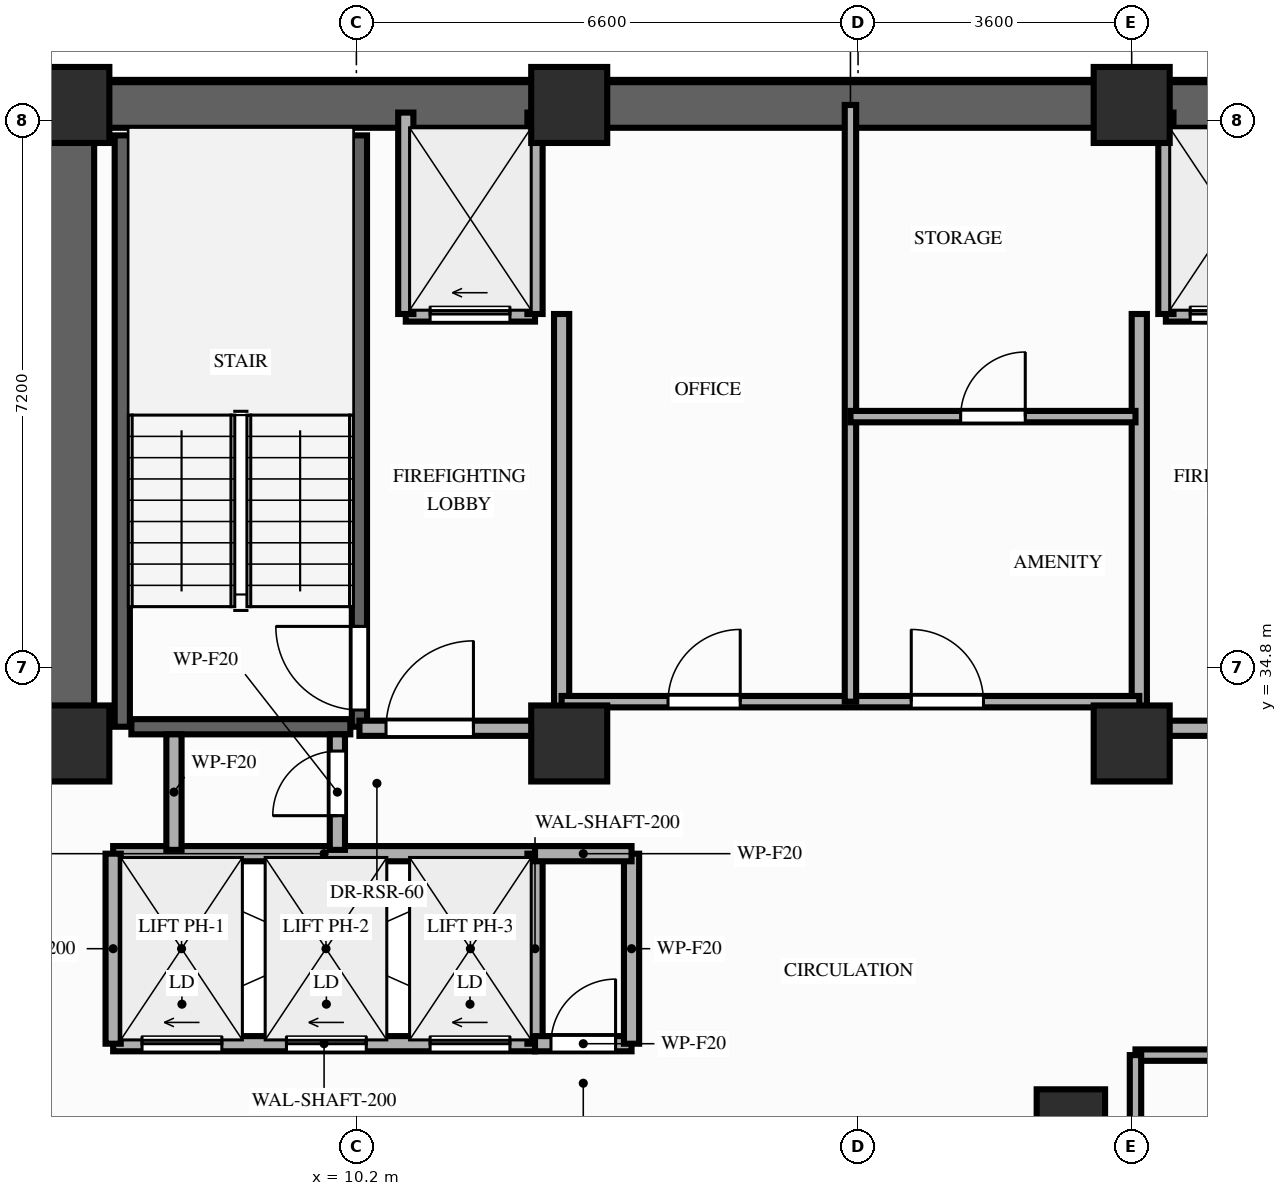
"""IFC4 building model, lengths in metres.
Left out: names, types, materials, properties, quantities, classifications, styles, units other than length and angle.
Written with IfcOpenShell. Run it as: python <this file> out.ifc"""

import sys

from ifc_helpers import new_model, si_unit, direction, frame, frame_2d, origin, origin_2d, place, context, subcontext, project, spatial, rectangle, extrude, element, fill, save


model = new_model("IFC4")
c1 = context("Model", 3, precision=1e-05, world=origin(), true_north=direction((0.0, 1.0)))
c2 = subcontext(c1, "Body", "Model", "MODEL_VIEW")
j1 = project(units=[si_unit("LENGTHUNIT", "METRE"), si_unit("PLANEANGLEUNIT", "RADIAN")], contexts=[c1])
p1 = place(None, origin())
s1 = spatial("IfcSite", under=j1, at=p1, CompositionType="ELEMENT")
p2 = place(p1, origin())
s2 = spatial("IfcBuilding", under=s1, at=p2, CompositionType="ELEMENT")
p3 = place(p2, frame((0.0, 0.0, 179.2)))
s3 = spatial("IfcBuildingStorey", under=s2, at=p3, CompositionType="ELEMENT", Elevation=179.2)
for number, where, z_axis, x_axis in (
    (1, (6.45, 33.8, 0.0), (0.0, 0.0, 1.0), (1.0, 0.0, 0.0)),
    (2, (13.0, 33.8, 0.0), (0.0, 0.0, 1.0), (1.0, 0.0, 0.0)),
    (3, (20.4, 33.8, 0.0), (0.0, 0.0, 1.0), (1.0, 0.0, 0.0)),
    (4, (6.45, 42.2, 0.0), (0.0, 0.0, 1.0), (1.0, 0.0, 0.0)),
    (5, (13.0, 42.2, 0.0), (0.0, 0.0, 1.0), (1.0, 0.0, 0.0)),
    (6, (20.4, 42.2, 0.0), (0.0, 0.0, 1.0), (1.0, 0.0, 0.0)),
):
    element("IfcColumn", number, at=place(p3, frame(where, z_axis=z_axis, x_axis=x_axis)), inside=s3, PredefinedType="COLUMN", context=c2, shape_type="SweptSolid", body=[
        extrude(rectangle(XDim=1.0, YDim=1.0, at=origin_2d()), origin(), (0.0, 0.0, 1.0), 3.2),
    ])
p4 = place(p3, frame((19.6, 28.8, 0.0), z_axis=(0.0, 0.0, 1.0), x_axis=(1.0, 0.0, 0.0)))
e7 = element("IfcColumn", 7, at=p4, inside=s3, PredefinedType="COLUMN", context=c2, shape_type="SweptSolid", body=[
    extrude(rectangle(XDim=0.9, YDim=0.9, at=origin_2d()), origin(), (0.0, 0.0, 1.0), 3.2),
])
p5 = place(p3, frame((6.45, 42.2, 0.0), z_axis=(0.0, 0.0, 1.0), x_axis=(1.0, 0.0, 0.0)))
e8 = element("IfcWall", 8, at=p5, inside=s3, PredefinedType="SHEAR", context=c2, shape_type="SweptSolid", body=[
    extrude(rectangle(XDim=20.45, YDim=0.6, at=frame_2d((10.225, 0.0))), origin(), (0.0, 0.0, 1.0), 3.02),
])
p6 = place(p3, frame((6.45, 33.8, 0.0), z_axis=(0.0, 0.0, 1.0), x_axis=(0.0, 1.0, 0.0)))
e9 = element("IfcWall", 9, at=p6, inside=s3, PredefinedType="SHEAR", context=c2, shape_type="SweptSolid", body=[
    extrude(rectangle(XDim=7.95, YDim=0.6, at=frame_2d((3.975, 0.0))), origin(), (0.0, 0.0, 1.0), 3.02),
])
p7 = place(p3, frame((7.12, 34.02, 0.0), z_axis=(0.0, 0.0, 1.0), x_axis=(0.0, 1.0, 0.0)))
e10 = element("IfcWall", 10, at=p7, inside=s3, PredefinedType="SHEAR", context=c2, shape_type="SweptSolid", body=[
    extrude(rectangle(XDim=7.78, YDim=0.2, at=frame_2d((3.89, 0.0))), origin(), (0.0, 0.0, 1.0), 3.02),
])
p8 = place(p3, frame((10.24, 34.02, 0.0), z_axis=(0.0, 0.0, 1.0), x_axis=(0.0, 1.0, 0.0)))
e11 = element("IfcWall", 11, at=p8, inside=s3, PredefinedType="SHEAR", context=c2, shape_type="SweptSolid", body=[
    extrude(rectangle(XDim=7.78, YDim=0.2, at=frame_2d((3.89, 0.0))), origin(), (0.0, 0.0, 1.0), 3.02),
])
p9 = place(p8, frame((0.22, 0.0, 0.0)))
e12 = element("IfcOpeningElement", 12, at=p9, cuts=e11, PredefinedType="OPENING", context=c2, shape_type="SweptSolid", body=[
    extrude(rectangle(XDim=1.1, YDim=2.15, at=frame_2d((0.55, 1.075))), frame((0.0, 0.11, 0.0), z_axis=(0.0, -1.0, 0.0), x_axis=(1.0, 0.0, 0.0)), (0.0, 0.0, 1.0), 0.22),
])
p10 = place(p3, frame((7.24, 34.02, 0.0), z_axis=(0.0, 0.0, 1.0), x_axis=(1.0, 0.0, 0.0)))
e13 = element("IfcWall", 13, at=p10, inside=s3, PredefinedType="SHEAR", context=c2, shape_type="SweptSolid", body=[
    extrude(rectangle(XDim=2.88, YDim=0.2, at=frame_2d((1.44, 0.0))), origin(), (0.0, 0.0, 1.0), 3.02),
])
p11 = place(p3, frame((7.0, 29.85, 0.0), z_axis=(0.0, 0.0, 1.0), x_axis=(1.0, 0.0, 0.0)))
e14 = element("IfcWall", 14, at=p11, inside=s3, PredefinedType="MOVABLE", context=c2, shape_type="SweptSolid", body=[
    extrude(rectangle(XDim=5.55, YDim=0.2, at=frame_2d((2.775, 0.0))), origin(), (0.0, 0.0, 1.0), 3.02),
])
p12 = place(p11, frame((0.38, 0.0, 0.0)))
e15 = element("IfcOpeningElement", 15, at=p12, cuts=e14, PredefinedType="OPENING", context=c2, shape_type="SweptSolid", body=[
    extrude(rectangle(XDim=1.05, YDim=2.15, at=frame_2d((0.525, 1.075))), frame((0.0, 0.11, 0.0), z_axis=(0.0, -1.0, 0.0), x_axis=(1.0, 0.0, 0.0)), (0.0, 0.0, 1.0), 0.22),
])
p13 = place(p11, frame((2.28, 0.0, 0.0)))
e16 = element("IfcOpeningElement", 16, at=p13, cuts=e14, PredefinedType="OPENING", context=c2, shape_type="SweptSolid", body=[
    extrude(rectangle(XDim=1.05, YDim=2.15, at=frame_2d((0.525, 1.075))), frame((0.0, 0.11, 0.0), z_axis=(0.0, -1.0, 0.0), x_axis=(1.0, 0.0, 0.0)), (0.0, 0.0, 1.0), 0.22),
])
p14 = place(p11, frame((4.17, 0.0, 0.0)))
e17 = element("IfcOpeningElement", 17, at=p14, cuts=e14, PredefinedType="OPENING", context=c2, shape_type="SweptSolid", body=[
    extrude(rectangle(XDim=1.05, YDim=2.15, at=frame_2d((0.525, 1.075))), frame((0.0, 0.11, 0.0), z_axis=(0.0, -1.0, 0.0), x_axis=(1.0, 0.0, 0.0)), (0.0, 0.0, 1.0), 0.22),
])
p15 = place(p3, frame((7.0, 32.35, 0.0), z_axis=(0.0, 0.0, 1.0), x_axis=(1.0, 0.0, 0.0)))
e18 = element("IfcWall", 18, at=p15, inside=s3, PredefinedType="MOVABLE", context=c2, shape_type="SweptSolid", body=[
    extrude(rectangle(XDim=5.55, YDim=0.2, at=frame_2d((2.775, 0.0))), origin(), (0.0, 0.0, 1.0), 3.02),
])
for number, where, z_axis, x_axis in (
    (19, (7.0, 29.85, 0.0), (0.0, 0.0, 1.0), (0.0, 1.0, 0.0)),
    (20, (12.55, 29.85, 0.0), (0.0, 0.0, 1.0), (0.0, 1.0, 0.0)),
):
    element("IfcWall", number, at=place(p3, frame(where, z_axis=z_axis, x_axis=x_axis)), inside=s3, PredefinedType="MOVABLE", context=c2, shape_type="SweptSolid", body=[
        extrude(rectangle(XDim=2.5, YDim=0.2, at=frame_2d((1.25, 0.0))), origin(), (0.0, 0.0, 1.0), 3.02),
    ])
p16 = place(p3, frame((10.85, 39.45, 0.0), z_axis=(0.0, 0.0, 1.0), x_axis=(1.0, 0.0, 0.0)))
e21 = element("IfcWall", 21, at=p16, inside=s3, PredefinedType="MOVABLE", context=c2, shape_type="SweptSolid", body=[
    extrude(rectangle(XDim=1.7, YDim=0.2, at=frame_2d((0.85, 0.0))), origin(), (0.0, 0.0, 1.0), 3.02),
])
p17 = place(p16, frame((0.32, 0.0, 0.0)))
e22 = element("IfcOpeningElement", 22, at=p17, cuts=e21, PredefinedType="OPENING", context=c2, shape_type="SweptSolid", body=[
    extrude(rectangle(XDim=1.05, YDim=2.15, at=frame_2d((0.525, 1.075))), frame((0.0, 0.11, 0.0), z_axis=(0.0, -1.0, 0.0), x_axis=(1.0, 0.0, 0.0)), (0.0, 0.0, 1.0), 0.22),
])
p18 = place(p3, frame((20.85, 39.45, 0.0), z_axis=(0.0, 0.0, 1.0), x_axis=(1.0, 0.0, 0.0)))
e23 = element("IfcWall", 23, at=p18, inside=s3, PredefinedType="MOVABLE", context=c2, shape_type="SweptSolid", body=[
    extrude(rectangle(XDim=1.7, YDim=0.2, at=frame_2d((0.85, 0.0))), origin(), (0.0, 0.0, 1.0), 3.02),
])
p19 = place(p18, frame((0.32, 0.0, 0.0)))
e24 = element("IfcOpeningElement", 24, at=p19, cuts=e23, PredefinedType="OPENING", context=c2, shape_type="SweptSolid", body=[
    extrude(rectangle(XDim=1.05, YDim=2.15, at=frame_2d((0.525, 1.075))), frame((0.0, 0.11, 0.0), z_axis=(0.0, -1.0, 0.0), x_axis=(1.0, 0.0, 0.0)), (0.0, 0.0, 1.0), 0.22),
])
for number, where, z_axis, x_axis in (
    (25, (10.85, 39.45, 0.0), (0.0, 0.0, 1.0), (0.0, 1.0, 0.0)),
    (26, (12.55, 39.45, 0.0), (0.0, 0.0, 1.0), (0.0, 1.0, 0.0)),
):
    element("IfcWall", number, at=place(p3, frame(where, z_axis=z_axis, x_axis=x_axis)), inside=s3, PredefinedType="MOVABLE", context=c2, shape_type="SweptSolid", body=[
        extrude(rectangle(XDim=2.65, YDim=0.2, at=frame_2d((1.325, 0.0))), origin(), (0.0, 0.0, 1.0), 2.45),
    ])
p20 = place(p3, frame((12.9, 34.0, 0.0), z_axis=(0.0, 0.0, 1.0), x_axis=(0.0, 1.0, 0.0)))
e27 = element("IfcWall", 27, at=p20, inside=s3, PredefinedType="PARTITIONING", context=c2, shape_type="SweptSolid", body=[
    extrude(rectangle(XDim=5.45, YDim=0.2, at=frame_2d((2.725, 0.0))), origin(), (0.0, 0.0, 1.0), 2.45),
])
p21 = place(p3, frame((10.24, 34.0, 0.0), z_axis=(0.0, 0.0, 1.0), x_axis=(1.0, 0.0, 0.0)))
e28 = element("IfcWall", 28, at=p21, inside=s3, PredefinedType="PARTITIONING", context=c2, shape_type="SweptSolid", body=[
    extrude(rectangle(XDim=2.66, YDim=0.2, at=frame_2d((1.33, 0.0))), origin(), (0.0, 0.0, 1.0), 2.45),
])
p22 = place(p21, frame((0.35, 0.0, 0.0)))
e29 = element("IfcOpeningElement", 29, at=p22, cuts=e28, PredefinedType="OPENING", context=c2, shape_type="SweptSolid", body=[
    extrude(rectangle(XDim=1.15, YDim=2.15, at=frame_2d((0.575, 1.075))), frame((0.0, 0.11, 0.0), z_axis=(0.0, -1.0, 0.0), x_axis=(1.0, 0.0, 0.0)), (0.0, 0.0, 1.0), 0.22),
])
p23 = place(p3, frame((20.85, 39.45, 0.0), z_axis=(0.0, 0.0, 1.0), x_axis=(0.0, 1.0, 0.0)))
e30 = element("IfcWall", 30, at=p23, inside=s3, PredefinedType="MOVABLE", context=c2, shape_type="SweptSolid", body=[
    extrude(rectangle(XDim=2.65, YDim=0.2, at=frame_2d((1.325, 0.0))), origin(), (0.0, 0.0, 1.0), 2.45),
])
p24 = place(p3, frame((20.5, 34.0, 0.0), z_axis=(0.0, 0.0, 1.0), x_axis=(0.0, 1.0, 0.0)))
e31 = element("IfcWall", 31, at=p24, inside=s3, PredefinedType="PARTITIONING", context=c2, shape_type="SweptSolid", body=[
    extrude(rectangle(XDim=5.45, YDim=0.2, at=frame_2d((2.725, 0.0))), origin(), (0.0, 0.0, 1.0), 2.45),
])
p25 = place(p3, frame((20.5, 34.0, 0.0), z_axis=(0.0, 0.0, 1.0), x_axis=(1.0, 0.0, 0.0)))
e32 = element("IfcWall", 32, at=p25, inside=s3, PredefinedType="PARTITIONING", context=c2, shape_type="SweptSolid", body=[
    extrude(rectangle(XDim=2.6, YDim=0.2, at=frame_2d((1.3, 0.0))), origin(), (0.0, 0.0, 1.0), 2.45),
])
p26 = place(p25, frame((1.05, 0.0, 0.0)))
e33 = element("IfcOpeningElement", 33, at=p26, cuts=e32, PredefinedType="OPENING", context=c2, shape_type="SweptSolid", body=[
    extrude(rectangle(XDim=1.15, YDim=2.15, at=frame_2d((0.575, 1.075))), frame((0.0, 0.11, 0.0), z_axis=(0.0, -1.0, 0.0), x_axis=(1.0, 0.0, 0.0)), (0.0, 0.0, 1.0), 0.22),
])
p27 = place(p3, frame((12.55, 29.85, 0.0), z_axis=(0.0, 0.0, 1.0), x_axis=(1.0, 0.0, 0.0)))
e34 = element("IfcWall", 34, at=p27, inside=s3, PredefinedType="PARTITIONING", context=c2, shape_type="SweptSolid", body=[
    extrude(rectangle(XDim=1.27, YDim=0.2, at=frame_2d((0.635, 0.0))), origin(), (0.0, 0.0, 1.0), 3.02),
])
p28 = place(p27, frame((0.21, 0.0, 0.0)))
e35 = element("IfcOpeningElement", 35, at=p28, cuts=e34, PredefinedType="OPENING", context=c2, shape_type="SweptSolid", body=[
    extrude(rectangle(XDim=0.85, YDim=2.05, at=frame_2d((0.425, 1.025))), frame((0.0, 0.11, 0.0), z_axis=(0.0, -1.0, 0.0), x_axis=(1.0, 0.0, 0.0)), (0.0, 0.0, 1.0), 0.22),
])
p29 = place(p3, frame((13.82, 29.85, 0.0), z_axis=(0.0, 0.0, 1.0), x_axis=(0.0, 1.0, 0.0)))
e36 = element("IfcWall", 36, at=p29, inside=s3, PredefinedType="PARTITIONING", context=c2, shape_type="SweptSolid", body=[
    extrude(rectangle(XDim=2.5, YDim=0.2, at=frame_2d((1.25, 0.0))), origin(), (0.0, 0.0, 1.0), 3.02),
])
p30 = place(p3, frame((12.55, 32.35, 0.0), z_axis=(0.0, 0.0, 1.0), x_axis=(1.0, 0.0, 0.0)))
e37 = element("IfcWall", 37, at=p30, inside=s3, PredefinedType="PARTITIONING", context=c2, shape_type="SweptSolid", body=[
    extrude(rectangle(XDim=1.27, YDim=0.2, at=frame_2d((0.635, 0.0))), origin(), (0.0, 0.0, 1.0), 3.02),
])
p31 = place(p3, frame((7.8, 32.4, 0.0), z_axis=(0.0, 0.0, 1.0), x_axis=(0.0, 1.0, 0.0)))
e38 = element("IfcWall", 38, at=p31, inside=s3, PredefinedType="PARTITIONING", context=c2, shape_type="SweptSolid", body=[
    extrude(rectangle(XDim=1.52, YDim=0.2, at=frame_2d((0.76, 0.0))), origin(), (0.0, 0.0, 1.0), 2.45),
])
p32 = place(p3, frame((9.95, 32.4, 0.0), z_axis=(0.0, 0.0, 1.0), x_axis=(0.0, 1.0, 0.0)))
e39 = element("IfcWall", 39, at=p32, inside=s3, PredefinedType="PARTITIONING", context=c2, shape_type="SweptSolid", body=[
    extrude(rectangle(XDim=1.52, YDim=0.2, at=frame_2d((0.76, 0.0))), origin(), (0.0, 0.0, 1.0), 2.45),
])
p33 = place(p32, frame((0.45, 0.0, 0.0)))
e40 = element("IfcOpeningElement", 40, at=p33, cuts=e39, PredefinedType="OPENING", context=c2, shape_type="SweptSolid", body=[
    extrude(rectangle(XDim=0.85, YDim=2.05, at=frame_2d((0.425, 1.025))), frame((0.0, 0.11, 0.0), z_axis=(0.0, -1.0, 0.0), x_axis=(1.0, 0.0, 0.0)), (0.0, 0.0, 1.0), 0.22),
])
p34 = place(p3, frame((12.9, 34.35, 0.0), z_axis=(0.0, 0.0, 1.0), x_axis=(1.0, 0.0, 0.0)))
e41 = element("IfcWall", 41, at=p34, inside=s3, PredefinedType="PARTITIONING", context=c2, shape_type="SweptSolid", body=[
    extrude(rectangle(XDim=7.6, YDim=0.15, at=frame_2d((3.8, 0.0))), origin(), (0.0, 0.0, 1.0), 3.02),
])
p35 = place(p34, frame((1.4, 0.0, 0.0)))
e42 = element("IfcOpeningElement", 42, at=p35, cuts=e41, PredefinedType="OPENING", context=c2, shape_type="SweptSolid", body=[
    extrude(rectangle(XDim=0.95, YDim=2.15, at=frame_2d((0.475, 1.075))), frame((0.0, 0.085, 0.0), z_axis=(0.0, -1.0, 0.0), x_axis=(1.0, 0.0, 0.0)), (0.0, 0.0, 1.0), 0.17),
])
p36 = place(p34, frame((4.6, 0.0, 0.0)))
e43 = element("IfcOpeningElement", 43, at=p36, cuts=e41, PredefinedType="OPENING", context=c2, shape_type="SweptSolid", body=[
    extrude(rectangle(XDim=0.95, YDim=2.15, at=frame_2d((0.475, 1.075))), frame((0.0, 0.085, 0.0), z_axis=(0.0, -1.0, 0.0), x_axis=(1.0, 0.0, 0.0)), (0.0, 0.0, 1.0), 0.17),
])
p37 = place(p3, frame((16.7, 34.35, 0.0), z_axis=(0.0, 0.0, 1.0), x_axis=(0.0, 1.0, 0.0)))
e44 = element("IfcWall", 44, at=p37, inside=s3, PredefinedType="PARTITIONING", context=c2, shape_type="SweptSolid", body=[
    extrude(rectangle(XDim=7.85, YDim=0.15, at=frame_2d((3.925, 0.0))), origin(), (0.0, 0.0, 1.0), 2.45),
])
p38 = place(p3, frame((16.7, 38.1, 0.0), z_axis=(0.0, 0.0, 1.0), x_axis=(1.0, 0.0, 0.0)))
e45 = element("IfcWall", 45, at=p38, inside=s3, PredefinedType="PARTITIONING", context=c2, shape_type="SweptSolid", body=[
    extrude(rectangle(XDim=3.75, YDim=0.15, at=frame_2d((1.875, 0.0))), origin(), (0.0, 0.0, 1.0), 3.02),
])
p39 = place(p38, frame((1.45, 0.0, 0.0)))
e46 = element("IfcOpeningElement", 46, at=p39, cuts=e45, PredefinedType="OPENING", context=c2, shape_type="SweptSolid", body=[
    extrude(rectangle(XDim=0.85, YDim=2.05, at=frame_2d((0.425, 1.025))), frame((0.0, 0.085, 0.0), z_axis=(0.0, -1.0, 0.0), x_axis=(1.0, 0.0, 0.0)), (0.0, 0.0, 1.0), 0.17),
])
p40 = place(p3, frame((20.45, 29.7, 0.0), z_axis=(0.0, 0.0, 1.0), x_axis=(1.0, 0.0, 0.0)))
e47 = element("IfcWall", 47, at=p40, inside=s3, PredefinedType="PARTITIONING", context=c2, shape_type="SweptSolid", body=[
    extrude(rectangle(XDim=6.7, YDim=0.15, at=frame_2d((3.35, 0.0))), origin(), (0.0, 0.0, 1.0), 3.02),
])
p41 = place(p40, frame((2.8, 0.0, 0.0)))
e48 = element("IfcOpeningElement", 48, at=p41, cuts=e47, PredefinedType="OPENING", context=c2, shape_type="SweptSolid", body=[
    extrude(rectangle(XDim=0.95, YDim=2.15, at=frame_2d((0.475, 1.075))), frame((0.0, 0.085, 0.0), z_axis=(0.0, -1.0, 0.0), x_axis=(1.0, 0.0, 0.0)), (0.0, 0.0, 1.0), 0.17),
])
p42 = place(p3, frame((20.45, 26.75, 0.0), z_axis=(0.0, 0.0, 1.0), x_axis=(0.0, 1.0, 0.0)))
e49 = element("IfcWall", 49, at=p42, inside=s3, PredefinedType="PARTITIONING", context=c2, shape_type="SweptSolid", body=[
    extrude(rectangle(XDim=2.95, YDim=0.15, at=frame_2d((1.475, 0.0))), origin(), (0.0, 0.0, 1.0), 2.45),
])
p43 = place(p9, origin())
e50 = element("IfcDoor", 50, at=p43, inside=s3, OperationType="SINGLE_SWING_RIGHT", PredefinedType="DOOR", context=c2, shape_type="SweptSolid", body=[
    extrude(rectangle(XDim=1.1, YDim=2.15, at=frame_2d((0.55, 1.075))), frame((0.0, 0.025, 0.0), z_axis=(0.0, -1.0, 0.0), x_axis=(1.0, 0.0, 0.0)), (0.0, 0.0, 1.0), 0.05),
])
fill(e12, e50)
p44 = place(p12, origin())
e51 = element("IfcDoor", 51, at=p44, inside=s3, OperationType="SLIDING_TO_LEFT", PredefinedType="DOOR", context=c2, shape_type="SweptSolid", body=[
    extrude(rectangle(XDim=1.05, YDim=2.15, at=frame_2d((0.525, 1.075))), frame((0.0, 0.025, 0.0), z_axis=(0.0, -1.0, 0.0), x_axis=(1.0, 0.0, 0.0)), (0.0, 0.0, 1.0), 0.05),
])
fill(e15, e51)
p45 = place(p13, origin())
e52 = element("IfcDoor", 52, at=p45, inside=s3, OperationType="SLIDING_TO_LEFT", PredefinedType="DOOR", context=c2, shape_type="SweptSolid", body=[
    extrude(rectangle(XDim=1.05, YDim=2.15, at=frame_2d((0.525, 1.075))), frame((0.0, 0.025, 0.0), z_axis=(0.0, -1.0, 0.0), x_axis=(1.0, 0.0, 0.0)), (0.0, 0.0, 1.0), 0.05),
])
fill(e16, e52)
p46 = place(p14, origin())
e53 = element("IfcDoor", 53, at=p46, inside=s3, OperationType="SLIDING_TO_LEFT", PredefinedType="DOOR", context=c2, shape_type="SweptSolid", body=[
    extrude(rectangle(XDim=1.05, YDim=2.15, at=frame_2d((0.525, 1.075))), frame((0.0, 0.025, 0.0), z_axis=(0.0, -1.0, 0.0), x_axis=(1.0, 0.0, 0.0)), (0.0, 0.0, 1.0), 0.05),
])
fill(e17, e53)
p47 = place(p17, origin())
e54 = element("IfcDoor", 54, at=p47, inside=s3, OperationType="SLIDING_TO_LEFT", PredefinedType="DOOR", context=c2, shape_type="SweptSolid", body=[
    extrude(rectangle(XDim=1.05, YDim=2.15, at=frame_2d((0.525, 1.075))), frame((0.0, 0.025, 0.0), z_axis=(0.0, -1.0, 0.0), x_axis=(1.0, 0.0, 0.0)), (0.0, 0.0, 1.0), 0.05),
])
fill(e22, e54)
p48 = place(p19, origin())
e55 = element("IfcDoor", 55, at=p48, inside=s3, OperationType="SLIDING_TO_LEFT", PredefinedType="DOOR", context=c2, shape_type="SweptSolid", body=[
    extrude(rectangle(XDim=1.05, YDim=2.15, at=frame_2d((0.525, 1.075))), frame((0.0, 0.025, 0.0), z_axis=(0.0, -1.0, 0.0), x_axis=(1.0, 0.0, 0.0)), (0.0, 0.0, 1.0), 0.05),
])
fill(e24, e55)
p49 = place(p22, origin())
e56 = element("IfcDoor", 56, at=p49, inside=s3, OperationType="SINGLE_SWING_RIGHT", PredefinedType="DOOR", context=c2, shape_type="SweptSolid", body=[
    extrude(rectangle(XDim=1.15, YDim=2.15, at=frame_2d((0.575, 1.075))), frame((0.0, 0.025, 0.0), z_axis=(0.0, -1.0, 0.0), x_axis=(1.0, 0.0, 0.0)), (0.0, 0.0, 1.0), 0.05),
])
fill(e29, e56)
p50 = place(p28, origin())
e57 = element("IfcDoor", 57, at=p50, inside=s3, OperationType="SINGLE_SWING_RIGHT", PredefinedType="DOOR", context=c2, shape_type="SweptSolid", body=[
    extrude(rectangle(XDim=0.85, YDim=2.05, at=frame_2d((0.425, 1.025))), frame((0.0, 0.025, 0.0), z_axis=(0.0, -1.0, 0.0), x_axis=(1.0, 0.0, 0.0)), (0.0, 0.0, 1.0), 0.05),
])
fill(e35, e57)
p51 = place(p33, origin())
e58 = element("IfcDoor", 58, at=p51, inside=s3, OperationType="SINGLE_SWING_LEFT", PredefinedType="DOOR", context=c2, shape_type="SweptSolid", body=[
    extrude(rectangle(XDim=0.85, YDim=2.05, at=frame_2d((0.425, 1.025))), frame((0.0, 0.025, 0.0), z_axis=(0.0, -1.0, 0.0), x_axis=(1.0, 0.0, 0.0)), (0.0, 0.0, 1.0), 0.05),
])
fill(e40, e58)
p52 = place(p35, origin())
e59 = element("IfcDoor", 59, at=p52, inside=s3, OperationType="SINGLE_SWING_RIGHT", PredefinedType="DOOR", context=c2, shape_type="SweptSolid", body=[
    extrude(rectangle(XDim=0.95, YDim=2.15, at=frame_2d((0.475, 1.075))), frame((0.0, 0.025, 0.0), z_axis=(0.0, -1.0, 0.0), x_axis=(1.0, 0.0, 0.0)), (0.0, 0.0, 1.0), 0.05),
])
fill(e42, e59)
p53 = place(p36, origin())
e60 = element("IfcDoor", 60, at=p53, inside=s3, OperationType="SINGLE_SWING_LEFT", PredefinedType="DOOR", context=c2, shape_type="SweptSolid", body=[
    extrude(rectangle(XDim=0.95, YDim=2.15, at=frame_2d((0.475, 1.075))), frame((0.0, 0.025, 0.0), z_axis=(0.0, -1.0, 0.0), x_axis=(1.0, 0.0, 0.0)), (0.0, 0.0, 1.0), 0.05),
])
fill(e43, e60)
p54 = place(p39, origin())
e61 = element("IfcDoor", 61, at=p54, inside=s3, OperationType="SINGLE_SWING_RIGHT", PredefinedType="DOOR", context=c2, shape_type="SweptSolid", body=[
    extrude(rectangle(XDim=0.85, YDim=2.05, at=frame_2d((0.425, 1.025))), frame((0.0, 0.025, 0.0), z_axis=(0.0, -1.0, 0.0), x_axis=(1.0, 0.0, 0.0)), (0.0, 0.0, 1.0), 0.05),
])
fill(e46, e61)
save(model, sys.argv[1])
